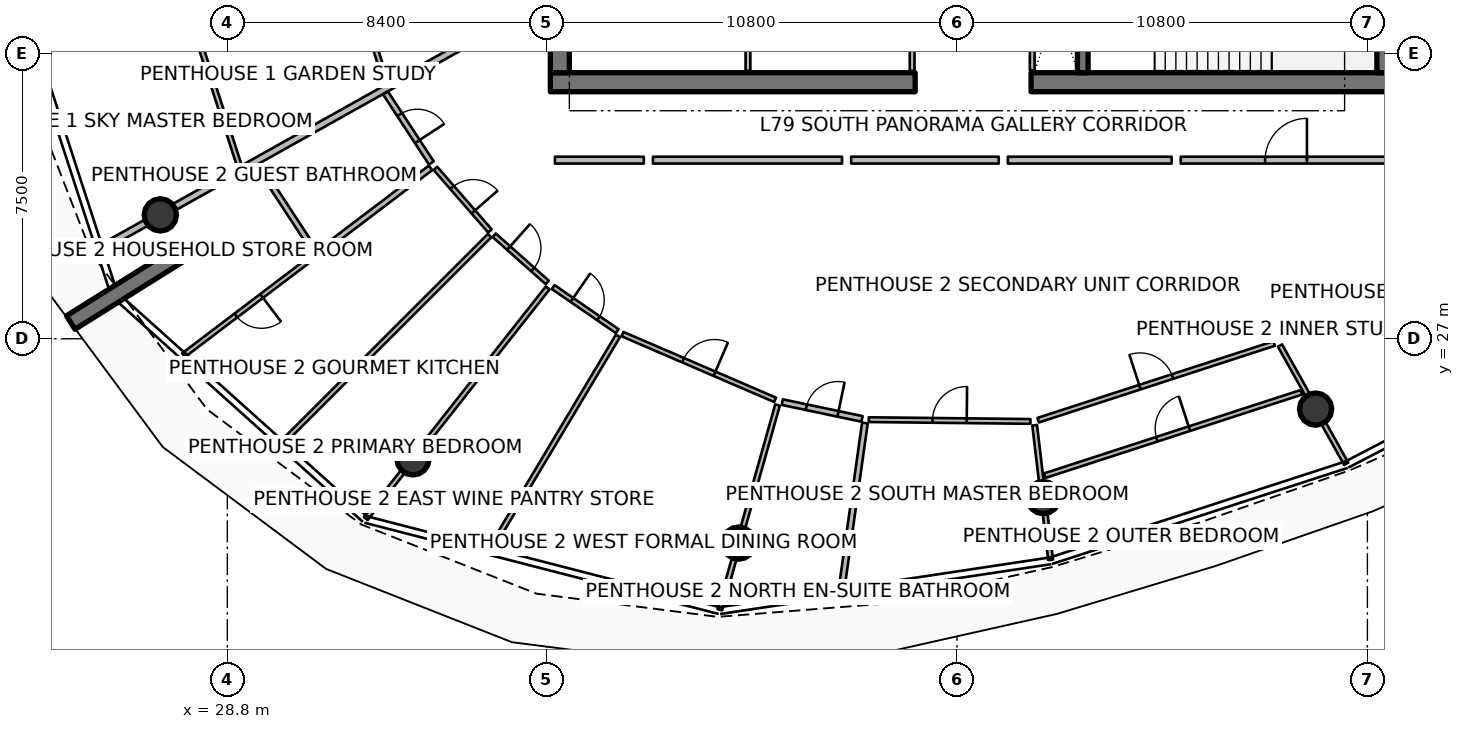
"""IFC4 building model, lengths in metres.
Left out: names, types, materials, properties, quantities, classifications, styles, units other than length and angle.
Written with IfcOpenShell. Run it as: python <this file> out.ifc"""

import sys

from ifc_helpers import new_model, si_unit, direction, frame, frame_2d, origin, origin_2d, place, context, subcontext, project, spatial, rectangle, circle, extrude, element, fill, save


model = new_model("IFC4")
c1 = context("Model", 3, precision=1e-05, world=origin(), true_north=direction((0.0, 1.0)))
c2 = subcontext(c1, "Body", "Model", "MODEL_VIEW")
j1 = project(units=[si_unit("LENGTHUNIT", "METRE"), si_unit("PLANEANGLEUNIT", "RADIAN")], contexts=[c1])
p1 = place(None, origin())
s1 = spatial("IfcSite", under=j1, at=p1, CompositionType="ELEMENT")
p2 = place(p1, origin())
s2 = spatial("IfcBuilding", under=s1, at=p2, CompositionType="ELEMENT")
p3 = place(p2, frame((0.0, 0.0, 313.7)))
s3 = spatial("IfcBuildingStorey", under=s2, at=p3, CompositionType="ELEMENT", Elevation=313.7)
p4 = place(p3, frame((37.3, 33.75, 0.0), z_axis=(0.0, 0.0, 1.0), x_axis=(1.0, 0.0, 0.0)))
e1 = element("IfcWall", 1, at=p4, inside=s3, PredefinedType="SHEAR", context=c2, shape_type="SweptSolid", body=[
    extrude(rectangle(XDim=9.6, YDim=0.5, at=frame_2d((4.8, 0.0))), origin(), (0.0, 0.0, 1.0), 4.2),
])
p5 = place(p3, frame((49.95, 33.75, 0.0), z_axis=(0.0, 0.0, 1.0), x_axis=(1.0, 0.0, 0.0)))
e2 = element("IfcWall", 2, at=p5, inside=s3, PredefinedType="SHEAR", context=c2, shape_type="SweptSolid", body=[
    extrude(rectangle(XDim=9.6, YDim=0.5, at=frame_2d((4.8, 0.0))), origin(), (0.0, 0.0, 1.0), 4.2),
])
for number, where, z_axis, x_axis in (
    (3, (37.55, 34.0, 0.0), (0.0, 0.0, 1.0), (0.0, 1.0, 0.0)),
    (4, (59.3, 34.0, 0.0), (0.0, 0.0, 1.0), (0.0, 1.0, 0.0)),
):
    element("IfcWall", number, at=place(p3, frame(where, z_axis=z_axis, x_axis=x_axis)), inside=s3, PredefinedType="SHEAR", context=c2, shape_type="SweptSolid", body=[
        extrude(rectangle(XDim=16.0, YDim=0.5, at=frame_2d((8.0, 0.0))), origin(), (0.0, 0.0, 1.0), 4.2),
    ])
p6 = place(p3, frame((51.31, 34.0, 0.0), z_axis=(0.0, 0.0, 1.0), x_axis=(0.0, 1.0, 0.0)))
e5 = element("IfcWall", 5, at=p6, inside=s3, PredefinedType="SHEAR", context=c2, shape_type="SweptSolid", body=[
    extrude(rectangle(XDim=3.5, YDim=0.28, at=frame_2d((1.75, 0.0))), origin(), (0.0, 0.0, 1.0), 4.2),
])
p7 = place(p3, frame((27.647, 29.282, 0.0), z_axis=(0.0, 0.0, 1.0), x_axis=(-0.848053161125, -0.529911158502, 0.0)))
e6 = element("IfcWall", 6, at=p7, inside=s3, PredefinedType="SOLIDWALL", context=c2, shape_type="SweptSolid", body=[
    extrude(rectangle(XDim=3.5, YDim=0.42, at=frame_2d((1.75, 0.0))), origin(), (0.0, 0.0, 1.0), 4.2),
])
for number, where, z_axis, x_axis in (
    (7, (27.037, 30.26, 0.0), (0.0, 0.0, 1.0), (1.0, 0.0, 0.0)),
    (8, (33.684, 23.841, 0.0), (0.0, 0.0, 1.0), (1.0, 0.0, 0.0)),
    (9, (42.253, 21.624, 0.0), (0.0, 0.0, 1.0), (1.0, 0.0, 0.0)),
    (10, (50.27, 22.821, 0.0), (0.0, 0.0, 1.0), (1.0, 0.0, 0.0)),
    (11, (57.437, 25.149, 0.0), (0.0, 0.0, 1.0), (1.0, 0.0, 0.0)),
):
    element("IfcColumn", number, at=place(p3, frame(where, z_axis=z_axis, x_axis=x_axis)), inside=s3, PredefinedType="COLUMN", context=c2, shape_type="SweptSolid", body=[
        extrude(circle(Radius=0.425, at=origin_2d()), origin(), (0.0, 0.0, 1.0), 3.94),
    ])
for number, where, z_axis, x_axis in (
    (12, (46.82, 34.05, 0.0), (0.0, 0.0, 1.0), (0.0, 1.0, 0.0)),
    (13, (42.5, 34.05, 0.0), (0.0, 0.0, 1.0), (0.0, 1.0, 0.0)),
):
    element("IfcWall", number, at=place(p3, frame(where, z_axis=z_axis, x_axis=x_axis)), inside=s3, PredefinedType="PARTITIONING", context=c2, shape_type="SweptSolid", body=[
        extrude(rectangle(XDim=2.03, YDim=0.125, at=frame_2d((1.015, 0.0))), origin(), (0.0, 0.0, 1.0), 3.38),
    ])
p8 = place(p3, frame((49.98, 34.06, 0.0), z_axis=(0.0, 0.0, 1.0), x_axis=(0.0, 1.0, 0.0)))
e14 = element("IfcWall", 14, at=p8, inside=s3, PredefinedType="PARTITIONING", context=c2, shape_type="SweptSolid", body=[
    extrude(rectangle(XDim=3.4, YDim=0.125, at=frame_2d((1.7, 0.0))), origin(), (0.0, 0.0, 1.0), 3.38),
])
p9 = place(p3, frame((37.204, 35.954, 0.0), z_axis=(0.0, 0.0, 1.0), x_axis=(-0.872495191914, -0.488622697064, 0.0)))
e15 = element("IfcWall", 15, at=p9, inside=s3, PredefinedType="PARTITIONING", context=c2, shape_type="SweptSolid", body=[
    extrude(rectangle(XDim=13.462, YDim=0.18, at=frame_2d((6.731, 0.0))), origin(), (0.0, 0.0, 1.0), 3.38),
])
p10 = place(p3, frame((30.99, 39.878, 0.0), z_axis=(0.0, 0.0, 1.0), x_axis=(0.309026406972, -0.951053457905, 0.0)))
e16 = element("IfcWall", 16, at=p10, inside=s3, PredefinedType="PARTITIONING", context=c2, shape_type="SweptSolid", body=[
    extrude(rectangle(XDim=6.477, YDim=0.125, at=frame_2d((3.238, 0.0))), origin(), (0.0, 0.0, 1.0), 3.38),
])
p11 = place(p10, frame((2.788, 0.0, 0.0)))
e17 = element("IfcOpeningElement", 17, at=p11, cuts=e16, PredefinedType="OPENING", context=c2, shape_type="SweptSolid", body=[
    extrude(rectangle(XDim=0.9, YDim=2.08, at=frame_2d((0.45, 1.04))), frame((0.0, 0.073, 0.0), z_axis=(0.0, -1.0, 0.0), x_axis=(1.0, 0.0, 0.0)), (0.0, 0.0, 1.0), 0.145),
])
p12 = place(p3, frame((26.581, 39.356, 0.0), z_axis=(0.0, 0.0, 1.0), x_axis=(0.309000666789, -0.951061821294, 0.0)))
e18 = element("IfcWall", 18, at=p12, inside=s3, PredefinedType="PARTITIONING", context=c2, shape_type="SweptSolid", body=[
    extrude(rectangle(XDim=8.209, YDim=0.125, at=frame_2d((4.104, 0.0))), origin(), (0.0, 0.0, 1.0), 3.38),
])
p13 = place(p12, frame((3.655, 0.0, 0.0)))
e19 = element("IfcOpeningElement", 19, at=p13, cuts=e18, PredefinedType="OPENING", context=c2, shape_type="SweptSolid", body=[
    extrude(rectangle(XDim=0.9, YDim=2.08, at=frame_2d((0.45, 1.04))), frame((0.0, 0.073, 0.0), z_axis=(0.0, -1.0, 0.0), x_axis=(1.0, 0.0, 0.0)), (0.0, 0.0, 1.0), 0.145),
])
p14 = place(p3, frame((53.888, 31.7, 0.0), z_axis=(0.0, 0.0, 1.0), x_axis=(1.0, 0.0, 0.0)))
e20 = element("IfcWall", 20, at=p14, inside=s3, PredefinedType="PARTITIONING", context=c2, shape_type="SweptSolid", body=[
    extrude(rectangle(XDim=5.542, YDim=0.18, at=frame_2d((2.771, 0.0))), origin(), (0.0, 0.0, 1.0), 3.38),
])
p15 = place(p14, frame((2.221, 0.0, 0.0)))
e21 = element("IfcOpeningElement", 21, at=p15, cuts=e20, PredefinedType="OPENING", context=c2, shape_type="SweptSolid", body=[
    extrude(rectangle(XDim=1.1, YDim=2.1, at=frame_2d((0.55, 1.05))), frame((0.0, 0.1, 0.0), z_axis=(0.0, -1.0, 0.0), x_axis=(1.0, 0.0, 0.0)), (0.0, 0.0, 1.0), 0.2),
])
p16 = place(p3, frame((37.42, 31.7, 0.0), z_axis=(0.0, 0.0, 1.0), x_axis=(1.0, 0.0, 0.0)))
e22 = element("IfcWall", 22, at=p16, inside=s3, PredefinedType="PARTITIONING", context=c2, shape_type="SweptSolid", body=[
    extrude(rectangle(XDim=2.34, YDim=0.18, at=frame_2d((1.17, 0.0))), origin(), (0.0, 0.0, 1.0), 3.38),
])
p17 = place(p3, frame((32.964, 33.465, 0.0), z_axis=(0.0, 0.0, 1.0), x_axis=(0.547736904717, -0.836650633903, 0.0)))
e23 = element("IfcWall", 23, at=p17, inside=s3, PredefinedType="PARTITIONING", context=c2, shape_type="SweptSolid", body=[
    extrude(rectangle(XDim=2.199, YDim=0.15, at=frame_2d((1.099, 0.0))), origin(), (0.0, 0.0, 1.0), 3.38),
])
p18 = place(p17, frame((0.674, 0.0, 0.0)))
e24 = element("IfcOpeningElement", 24, at=p18, cuts=e23, PredefinedType="OPENING", context=c2, shape_type="SweptSolid", body=[
    extrude(rectangle(XDim=0.85, YDim=2.06, at=frame_2d((0.425, 1.03))), frame((0.0, 0.085, 0.0), z_axis=(0.0, -1.0, 0.0), x_axis=(1.0, 0.0, 0.0)), (0.0, 0.0, 1.0), 0.17),
])
p19 = place(p3, frame((29.605, 31.584, 0.0), z_axis=(0.0, 0.0, 1.0), x_axis=(0.547706970619, -0.836670230339, 0.0)))
e25 = element("IfcWall", 25, at=p19, inside=s3, PredefinedType="PARTITIONING", context=c2, shape_type="SweptSolid", body=[
    extrude(rectangle(XDim=2.731, YDim=0.15, at=frame_2d((1.365, 0.0))), origin(), (0.0, 0.0, 1.0), 3.38),
])
p20 = place(p3, frame((34.146, 31.496, 0.0), z_axis=(0.0, 0.0, 1.0), x_axis=(-0.796862333182, -0.60416092389, 0.0)))
e26 = element("IfcWall", 26, at=p20, inside=s3, PredefinedType="PARTITIONING", context=c2, shape_type="SweptSolid", body=[
    extrude(rectangle(XDim=3.72, YDim=0.15, at=frame_2d((1.86, 0.0))), origin(), (0.0, 0.0, 1.0), 3.38),
])
p21 = place(p3, frame((31.078, 29.17, 0.0), z_axis=(0.0, 0.0, 1.0), x_axis=(-0.796851341582, -0.604175421064, 0.0)))
e27 = element("IfcWall", 27, at=p21, inside=s3, PredefinedType="PARTITIONING", context=c2, shape_type="SweptSolid", body=[
    extrude(rectangle(XDim=4.304, YDim=0.125, at=frame_2d((2.152, 0.0))), origin(), (0.0, 0.0, 1.0), 3.38),
])
p22 = place(p21, frame((1.727, 0.0, 0.0)))
e28 = element("IfcOpeningElement", 28, at=p22, cuts=e27, PredefinedType="OPENING", context=c2, shape_type="SweptSolid", body=[
    extrude(rectangle(XDim=0.85, YDim=2.06, at=frame_2d((0.425, 1.03))), frame((0.0, 0.073, 0.0), z_axis=(0.0, -1.0, 0.0), x_axis=(1.0, 0.0, 0.0)), (0.0, 0.0, 1.0), 0.145),
])
p23 = place(p3, frame((35.7, 29.713, 0.0), z_axis=(0.0, 0.0, 1.0), x_axis=(-0.707470011435, -0.706743364256, 0.0)))
e29 = element("IfcWall", 29, at=p23, inside=s3, PredefinedType="PARTITIONING", context=c2, shape_type="SweptSolid", body=[
    extrude(rectangle(XDim=7.728, YDim=0.125, at=frame_2d((3.864, 0.0))), origin(), (0.0, 0.0, 1.0), 3.38),
])
p24 = place(p3, frame((34.277, 31.482, 0.0), z_axis=(0.0, 0.0, 1.0), x_axis=(0.656959210167, -0.753926121167, 0.0)))
e30 = element("IfcWall", 30, at=p24, inside=s3, PredefinedType="PARTITIONING", context=c2, shape_type="SweptSolid", body=[
    extrude(rectangle(XDim=2.183, YDim=0.125, at=frame_2d((1.091, 0.0))), origin(), (0.0, 0.0, 1.0), 3.38),
])
p25 = place(p24, frame((0.667, 0.0, 0.0)))
e31 = element("IfcOpeningElement", 31, at=p25, cuts=e30, PredefinedType="OPENING", context=c2, shape_type="SweptSolid", body=[
    extrude(rectangle(XDim=0.85, YDim=2.06, at=frame_2d((0.425, 1.03))), frame((0.0, 0.073, 0.0), z_axis=(0.0, -1.0, 0.0), x_axis=(1.0, 0.0, 0.0)), (0.0, 0.0, 1.0), 0.145),
])
p26 = place(p3, frame((35.823, 29.723, 0.0), z_axis=(0.0, 0.0, 1.0), x_axis=(0.747438201164, -0.664331344617, 0.0)))
e32 = element("IfcWall", 32, at=p26, inside=s3, PredefinedType="PARTITIONING", context=c2, shape_type="SweptSolid", body=[
    extrude(rectangle(XDim=1.865, YDim=0.125, at=frame_2d((0.933, 0.0))), origin(), (0.0, 0.0, 1.0), 3.38),
])
p27 = place(p26, frame((0.508, 0.0, 0.0)))
e33 = element("IfcOpeningElement", 33, at=p27, cuts=e32, PredefinedType="OPENING", context=c2, shape_type="SweptSolid", body=[
    extrude(rectangle(XDim=0.85, YDim=2.06, at=frame_2d((0.425, 1.03))), frame((0.0, 0.073, 0.0), z_axis=(0.0, -1.0, 0.0), x_axis=(1.0, 0.0, 0.0)), (0.0, 0.0, 1.0), 0.145),
])
p28 = place(p3, frame((40.0, 31.7, 0.0), z_axis=(0.0, 0.0, 1.0), x_axis=(1.0, 0.0, 0.0)))
e34 = element("IfcWall", 34, at=p28, inside=s3, PredefinedType="PARTITIONING", context=c2, shape_type="SweptSolid", body=[
    extrude(rectangle(XDim=4.975, YDim=0.18, at=frame_2d((2.488, 0.0))), origin(), (0.0, 0.0, 1.0), 3.38),
])
p29 = place(p3, frame((37.23, 28.339, 0.0), z_axis=(0.0, 0.0, 1.0), x_axis=(-0.619087123863, -0.785322311581, 0.0)))
e35 = element("IfcWall", 35, at=p29, inside=s3, PredefinedType="PARTITIONING", context=c2, shape_type="SweptSolid", body=[
    extrude(rectangle(XDim=7.731, YDim=0.125, at=frame_2d((3.865, 0.0))), origin(), (0.0, 0.0, 1.0), 3.38),
])
p30 = place(p3, frame((39.079, 27.077, 0.0), z_axis=(0.0, 0.0, 1.0), x_axis=(-0.513092804865, -0.858333136723, 0.0)))
e36 = element("IfcWall", 36, at=p30, inside=s3, PredefinedType="PARTITIONING", context=c2, shape_type="SweptSolid", body=[
    extrude(rectangle(XDim=6.58, YDim=0.125, at=frame_2d((3.29, 0.0))), origin(), (0.0, 0.0, 1.0), 3.38),
])
p31 = place(p3, frame((37.375, 28.361, 0.0), z_axis=(0.0, 0.0, 1.0), x_axis=(0.823529894266, -0.567272873712, 0.0)))
e37 = element("IfcWall", 37, at=p31, inside=s3, PredefinedType="PARTITIONING", context=c2, shape_type="SweptSolid", body=[
    extrude(rectangle(XDim=2.046, YDim=0.125, at=frame_2d((1.023, 0.0))), origin(), (0.0, 0.0, 1.0), 3.38),
])
p32 = place(p31, frame((0.598, 0.0, 0.0)))
e38 = element("IfcOpeningElement", 38, at=p32, cuts=e37, PredefinedType="OPENING", context=c2, shape_type="SweptSolid", body=[
    extrude(rectangle(XDim=0.85, YDim=2.06, at=frame_2d((0.425, 1.03))), frame((0.0, 0.073, 0.0), z_axis=(0.0, -1.0, 0.0), x_axis=(1.0, 0.0, 0.0)), (0.0, 0.0, 1.0), 0.145),
])
p33 = place(p3, frame((39.199, 27.123, 0.0), z_axis=(0.0, 0.0, 1.0), x_axis=(0.918386386282, -0.395684780466, 0.0)))
e39 = element("IfcWall", 39, at=p33, inside=s3, PredefinedType="PARTITIONING", context=c2, shape_type="SweptSolid", body=[
    extrude(rectangle(XDim=4.371, YDim=0.125, at=frame_2d((2.186, 0.0))), origin(), (0.0, 0.0, 1.0), 3.38),
])
p34 = place(p33, frame((1.736, 0.0, 0.0)))
e40 = element("IfcOpeningElement", 40, at=p34, cuts=e39, PredefinedType="OPENING", context=c2, shape_type="SweptSolid", body=[
    extrude(rectangle(XDim=0.9, YDim=2.08, at=frame_2d((0.45, 1.04))), frame((0.0, 0.073, 0.0), z_axis=(0.0, -1.0, 0.0), x_axis=(1.0, 0.0, 0.0)), (0.0, 0.0, 1.0), 0.145),
])
p35 = place(p3, frame((45.215, 31.7, 0.0), z_axis=(0.0, 0.0, 1.0), x_axis=(1.0, 0.0, 0.0)))
e41 = element("IfcWall", 41, at=p35, inside=s3, PredefinedType="PARTITIONING", context=c2, shape_type="SweptSolid", body=[
    extrude(rectangle(XDim=3.884, YDim=0.18, at=frame_2d((1.942, 0.0))), origin(), (0.0, 0.0, 1.0), 3.38),
])
p36 = place(p3, frame((43.278, 25.257, 0.0), z_axis=(0.0, 0.0, 1.0), x_axis=(-0.271452912573, -0.962451721519, 0.0)))
e42 = element("IfcWall", 42, at=p36, inside=s3, PredefinedType="PARTITIONING", context=c2, shape_type="SweptSolid", body=[
    extrude(rectangle(XDim=5.597, YDim=0.125, at=frame_2d((2.798, 0.0))), origin(), (0.0, 0.0, 1.0), 3.38),
])
p37 = place(p3, frame((43.403, 25.333, 0.0), z_axis=(0.0, 0.0, 1.0), x_axis=(0.978565484163, -0.205935895864, 0.0)))
e43 = element("IfcWall", 43, at=p37, inside=s3, PredefinedType="PARTITIONING", context=c2, shape_type="SweptSolid", body=[
    extrude(rectangle(XDim=2.145, YDim=0.15, at=frame_2d((1.072, 0.0))), origin(), (0.0, 0.0, 1.0), 3.38),
])
p38 = place(p37, frame((0.647, 0.0, 0.0)))
e44 = element("IfcOpeningElement", 44, at=p38, cuts=e43, PredefinedType="OPENING", context=c2, shape_type="SweptSolid", body=[
    extrude(rectangle(XDim=0.85, YDim=2.06, at=frame_2d((0.425, 1.03))), frame((0.0, 0.085, 0.0), z_axis=(0.0, -1.0, 0.0), x_axis=(1.0, 0.0, 0.0)), (0.0, 0.0, 1.0), 0.17),
])
p39 = place(p3, frame((45.577, 24.784, 0.0), z_axis=(0.0, 0.0, 1.0), x_axis=(-0.139343441712, -0.99024411397, 0.0)))
e45 = element("IfcWall", 45, at=p39, inside=s3, PredefinedType="PARTITIONING", context=c2, shape_type="SweptSolid", body=[
    extrude(rectangle(XDim=4.475, YDim=0.15, at=frame_2d((2.237, 0.0))), origin(), (0.0, 0.0, 1.0), 3.38),
])
p40 = place(p3, frame((45.68, 24.872, 0.0), z_axis=(0.0, 0.0, 1.0), x_axis=(0.99993989629, -0.010963749724, 0.0)))
e46 = element("IfcWall", 46, at=p40, inside=s3, PredefinedType="PARTITIONING", context=c2, shape_type="SweptSolid", body=[
    extrude(rectangle(XDim=4.253, YDim=0.125, at=frame_2d((2.126, 0.0))), origin(), (0.0, 0.0, 1.0), 3.38),
])
p41 = place(p40, frame((1.677, 0.0, 0.0)))
e47 = element("IfcOpeningElement", 47, at=p41, cuts=e46, PredefinedType="OPENING", context=c2, shape_type="SweptSolid", body=[
    extrude(rectangle(XDim=0.9, YDim=2.08, at=frame_2d((0.45, 1.04))), frame((0.0, 0.073, 0.0), z_axis=(0.0, -1.0, 0.0), x_axis=(1.0, 0.0, 0.0)), (0.0, 0.0, 1.0), 0.145),
])
p42 = place(p3, frame((49.339, 31.7, 0.0), z_axis=(0.0, 0.0, 1.0), x_axis=(1.0, 0.0, 0.0)))
e48 = element("IfcWall", 48, at=p42, inside=s3, PredefinedType="PARTITIONING", context=c2, shape_type="SweptSolid", body=[
    extrude(rectangle(XDim=4.309, YDim=0.18, at=frame_2d((2.155, 0.0))), origin(), (0.0, 0.0, 1.0), 3.38),
])
p43 = place(p3, frame((50.045, 24.725, 0.0), z_axis=(0.0, 0.0, 1.0), x_axis=(0.117544267504, -0.993067643807, 0.0)))
e49 = element("IfcWall", 49, at=p43, inside=s3, PredefinedType="PARTITIONING", context=c2, shape_type="SweptSolid", body=[
    extrude(rectangle(XDim=3.566, YDim=0.125, at=frame_2d((1.783, 0.0))), origin(), (0.0, 0.0, 1.0), 3.38),
])
p44 = place(p3, frame((56.5, 26.822, 0.0), z_axis=(0.0, 0.0, 1.0), x_axis=(0.488645059518, -0.872482667913, 0.0)))
e50 = element("IfcWall", 50, at=p44, inside=s3, PredefinedType="PARTITIONING", context=c2, shape_type="SweptSolid", body=[
    extrude(rectangle(XDim=3.566, YDim=0.125, at=frame_2d((1.783, 0.0))), origin(), (0.0, 0.0, 1.0), 3.38),
])
p45 = place(p3, frame((50.137, 24.858, 0.0), z_axis=(0.0, 0.0, 1.0), x_axis=(0.95106401822, 0.30899390487, 0.0)))
e51 = element("IfcWall", 51, at=p45, inside=s3, PredefinedType="PARTITIONING", context=c2, shape_type="SweptSolid", body=[
    extrude(rectangle(XDim=6.529, YDim=0.125, at=frame_2d((3.264, 0.0))), origin(), (0.0, 0.0, 1.0), 3.38),
])
p46 = place(p45, frame((2.814, 0.0, 0.0)))
e52 = element("IfcOpeningElement", 52, at=p46, cuts=e51, PredefinedType="OPENING", context=c2, shape_type="SweptSolid", body=[
    extrude(rectangle(XDim=0.9, YDim=2.08, at=frame_2d((0.45, 1.04))), frame((0.0, 0.073, 0.0), z_axis=(0.0, -1.0, 0.0), x_axis=(1.0, 0.0, 0.0)), (0.0, 0.0, 1.0), 0.145),
])
p47 = place(p3, frame((50.31, 23.398, 0.0), z_axis=(0.0, 0.0, 1.0), x_axis=(0.951062105288, 0.308999792693, 0.0)))
e53 = element("IfcWall", 53, at=p47, inside=s3, PredefinedType="PARTITIONING", context=c2, shape_type="SweptSolid", body=[
    extrude(rectangle(XDim=7.102, YDim=0.125, at=frame_2d((3.551, 0.0))), origin(), (0.0, 0.0, 1.0), 3.38),
])
p48 = place(p47, frame((3.101, 0.0, 0.0)))
e54 = element("IfcOpeningElement", 54, at=p48, cuts=e53, PredefinedType="OPENING", context=c2, shape_type="SweptSolid", body=[
    extrude(rectangle(XDim=0.9, YDim=2.08, at=frame_2d((0.45, 1.04))), frame((0.0, 0.073, 0.0), z_axis=(0.0, -1.0, 0.0), x_axis=(1.0, 0.0, 0.0)), (0.0, 0.0, 1.0), 0.145),
])
p49 = place(p15, origin())
e55 = element("IfcDoor", 55, at=p49, inside=s3, OperationType="SINGLE_SWING_RIGHT", PredefinedType="DOOR", context=c2, shape_type="SweptSolid", body=[
    extrude(rectangle(XDim=1.1, YDim=2.1, at=frame_2d((0.55, 1.05))), frame((0.0, 0.025, 0.0), z_axis=(0.0, -1.0, 0.0), x_axis=(1.0, 0.0, 0.0)), (0.0, 0.0, 1.0), 0.05),
])
fill(e21, e55)
p50 = place(p18, origin())
e56 = element("IfcDoor", 56, at=p50, inside=s3, OperationType="SINGLE_SWING_RIGHT", PredefinedType="DOOR", context=c2, shape_type="SweptSolid", body=[
    extrude(rectangle(XDim=0.85, YDim=2.06, at=frame_2d((0.425, 1.03))), frame((0.0, 0.025, 0.0), z_axis=(0.0, -1.0, 0.0), x_axis=(1.0, 0.0, 0.0)), (0.0, 0.0, 1.0), 0.05),
])
fill(e24, e56)
p51 = place(p22, origin())
e57 = element("IfcDoor", 57, at=p51, inside=s3, OperationType="SINGLE_SWING_LEFT", PredefinedType="DOOR", context=c2, shape_type="SweptSolid", body=[
    extrude(rectangle(XDim=0.85, YDim=2.06, at=frame_2d((0.425, 1.03))), frame((0.0, 0.025, 0.0), z_axis=(0.0, -1.0, 0.0), x_axis=(1.0, 0.0, 0.0)), (0.0, 0.0, 1.0), 0.05),
])
fill(e28, e57)
p52 = place(p25, origin())
e58 = element("IfcDoor", 58, at=p52, inside=s3, OperationType="SINGLE_SWING_RIGHT", PredefinedType="DOOR", context=c2, shape_type="SweptSolid", body=[
    extrude(rectangle(XDim=0.85, YDim=2.06, at=frame_2d((0.425, 1.03))), frame((0.0, 0.025, 0.0), z_axis=(0.0, -1.0, 0.0), x_axis=(1.0, 0.0, 0.0)), (0.0, 0.0, 1.0), 0.05),
])
fill(e31, e58)
p53 = place(p27, origin())
e59 = element("IfcDoor", 59, at=p53, inside=s3, OperationType="SINGLE_SWING_LEFT", PredefinedType="DOOR", context=c2, shape_type="SweptSolid", body=[
    extrude(rectangle(XDim=0.85, YDim=2.06, at=frame_2d((0.425, 1.03))), frame((0.0, 0.025, 0.0), z_axis=(0.0, -1.0, 0.0), x_axis=(1.0, 0.0, 0.0)), (0.0, 0.0, 1.0), 0.05),
])
fill(e33, e59)
p54 = place(p32, origin())
e60 = element("IfcDoor", 60, at=p54, inside=s3, OperationType="SINGLE_SWING_LEFT", PredefinedType="DOOR", context=c2, shape_type="SweptSolid", body=[
    extrude(rectangle(XDim=0.85, YDim=2.06, at=frame_2d((0.425, 1.03))), frame((0.0, 0.025, 0.0), z_axis=(0.0, -1.0, 0.0), x_axis=(1.0, 0.0, 0.0)), (0.0, 0.0, 1.0), 0.05),
])
fill(e38, e60)
p55 = place(p34, origin())
e61 = element("IfcDoor", 61, at=p55, inside=s3, OperationType="SINGLE_SWING_RIGHT", PredefinedType="DOOR", context=c2, shape_type="SweptSolid", body=[
    extrude(rectangle(XDim=0.9, YDim=2.08, at=frame_2d((0.45, 1.04))), frame((0.0, 0.025, 0.0), z_axis=(0.0, -1.0, 0.0), x_axis=(1.0, 0.0, 0.0)), (0.0, 0.0, 1.0), 0.05),
])
fill(e40, e61)
p56 = place(p38, origin())
e62 = element("IfcDoor", 62, at=p56, inside=s3, OperationType="SINGLE_SWING_RIGHT", PredefinedType="DOOR", context=c2, shape_type="SweptSolid", body=[
    extrude(rectangle(XDim=0.85, YDim=2.06, at=frame_2d((0.425, 1.03))), frame((0.0, 0.025, 0.0), z_axis=(0.0, -1.0, 0.0), x_axis=(1.0, 0.0, 0.0)), (0.0, 0.0, 1.0), 0.05),
])
fill(e44, e62)
p57 = place(p41, origin())
e63 = element("IfcDoor", 63, at=p57, inside=s3, OperationType="SINGLE_SWING_RIGHT", PredefinedType="DOOR", context=c2, shape_type="SweptSolid", body=[
    extrude(rectangle(XDim=0.9, YDim=2.08, at=frame_2d((0.45, 1.04))), frame((0.0, 0.025, 0.0), z_axis=(0.0, -1.0, 0.0), x_axis=(1.0, 0.0, 0.0)), (0.0, 0.0, 1.0), 0.05),
])
fill(e47, e63)
p58 = place(p46, origin())
e64 = element("IfcDoor", 64, at=p58, inside=s3, OperationType="SINGLE_SWING_LEFT", PredefinedType="DOOR", context=c2, shape_type="SweptSolid", body=[
    extrude(rectangle(XDim=0.9, YDim=2.08, at=frame_2d((0.45, 1.04))), frame((0.0, 0.025, 0.0), z_axis=(0.0, -1.0, 0.0), x_axis=(1.0, 0.0, 0.0)), (0.0, 0.0, 1.0), 0.05),
])
fill(e52, e64)
p59 = place(p48, origin())
e65 = element("IfcDoor", 65, at=p59, inside=s3, OperationType="SINGLE_SWING_RIGHT", PredefinedType="DOOR", context=c2, shape_type="SweptSolid", body=[
    extrude(rectangle(XDim=0.9, YDim=2.08, at=frame_2d((0.45, 1.04))), frame((0.0, 0.025, 0.0), z_axis=(0.0, -1.0, 0.0), x_axis=(1.0, 0.0, 0.0)), (0.0, 0.0, 1.0), 0.05),
])
fill(e54, e65)
save(model, sys.argv[1])
